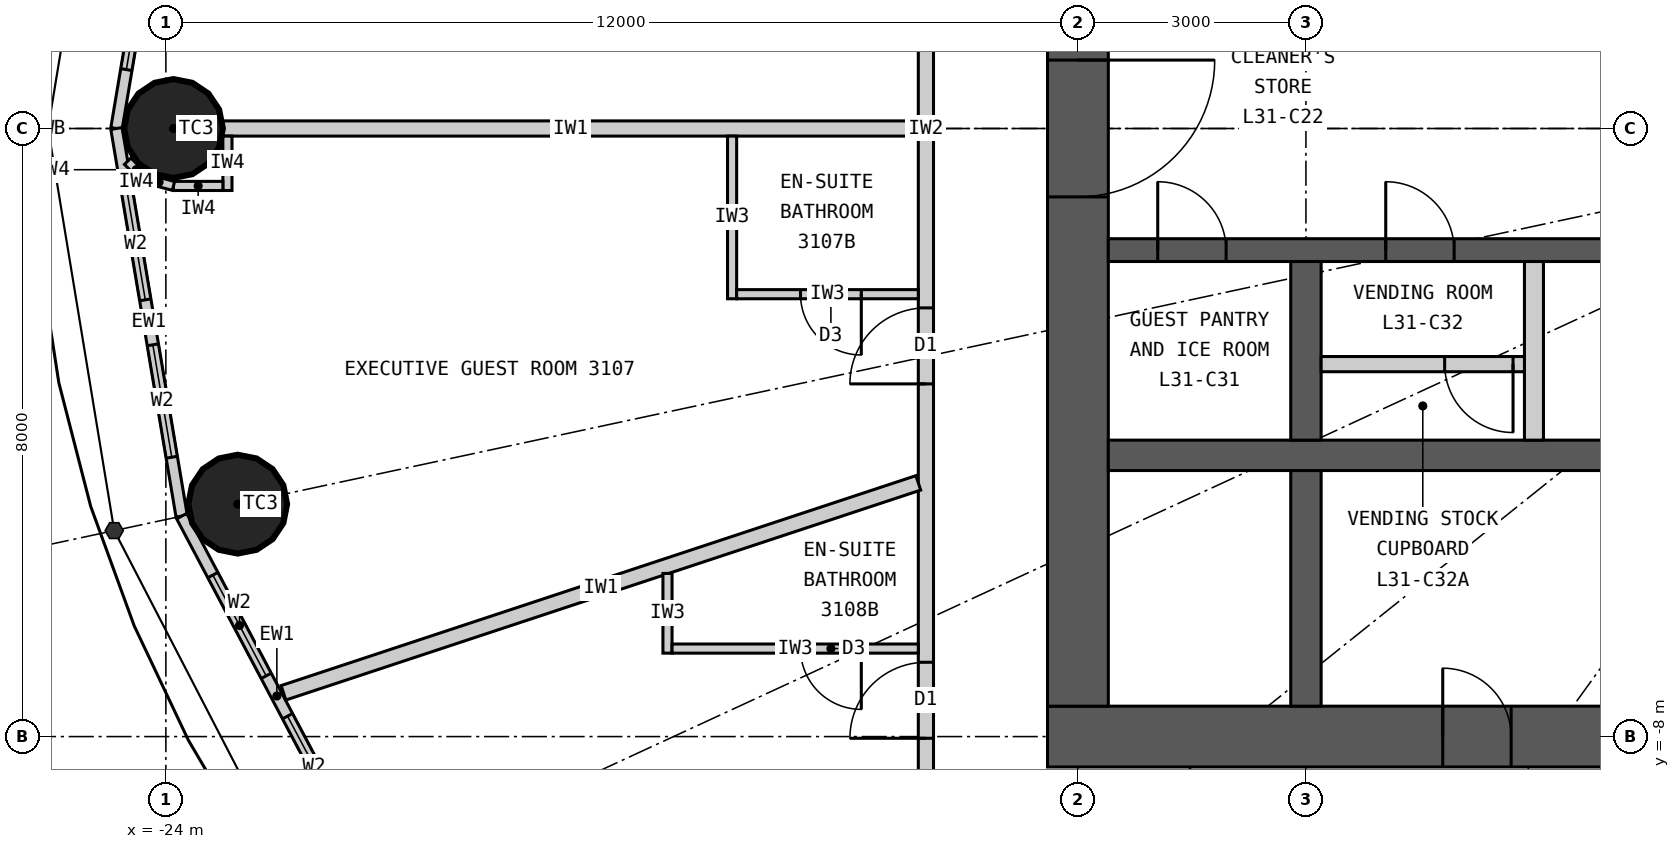
"""IFC4 building model, lengths in metres.
Left out: names, types, materials, properties, quantities, classifications, styles, units other than length and angle.
Written with IfcOpenShell. Run it as: python <this file> out.ifc"""

import sys

from ifc_helpers import new_model, si_unit, direction, frame, frame_2d, origin, origin_2d, place, context, subcontext, project, spatial, rectangle, circle, extrude, element, fill, save


model = new_model("IFC4")
c1 = context("Model", 3, precision=1e-05, world=origin(), true_north=direction((0.0, 1.0)))
c2 = subcontext(c1, "Body", "Model", "MODEL_VIEW")
j1 = project(units=[si_unit("LENGTHUNIT", "METRE"), si_unit("PLANEANGLEUNIT", "RADIAN")], contexts=[c1])
p1 = place(None, origin())
s1 = spatial("IfcSite", under=j1, at=p1, CompositionType="ELEMENT")
p2 = place(p1, origin())
s2 = spatial("IfcBuilding", under=s1, at=p2, CompositionType="ELEMENT")
p3 = place(p2, frame((0.0, 0.0, 122.1)))
s3 = spatial("IfcBuildingStorey", under=s2, at=p3, CompositionType="ELEMENT", Elevation=122.1)
for number, where, z_axis, x_axis in (
    (1, (-23.9, 0.0, 0.0), (0.0, 0.0, 1.0), (1.0, 0.0, 0.0)),
    (2, (-23.055, -4.942, 0.0), (0.0, 0.0, 1.0), (1.0, 0.0, 0.0)),
):
    element("IfcColumn", number, at=place(p3, frame(where, z_axis=z_axis, x_axis=x_axis)), inside=s3, PredefinedType="COLUMN", context=c2, shape_type="SweptSolid", body=[
        extrude(circle(Radius=0.65, at=origin_2d()), origin(), (0.0, 0.0, 1.0), 3.3),
    ])
p4 = place(p3, frame((12.4, -8.0, 0.0), z_axis=(0.0, 0.0, 1.0), x_axis=(-1.0, 0.0, 0.0)))
e3 = element("IfcWall", 3, at=p4, inside=s3, PredefinedType="SHEAR", context=c2, shape_type="SweptSolid", body=[
    extrude(rectangle(XDim=24.8, YDim=0.8, at=frame_2d((12.4, 0.0))), origin(), (0.0, 0.0, 1.0), 3.3),
])
p5 = place(p4, frame((11.1, 0.0, 0.0)))
e4 = element("IfcOpeningElement", 4, at=p5, cuts=e3, PredefinedType="OPENING", context=c2, shape_type="SweptSolid", body=[
    extrude(rectangle(XDim=1.2, YDim=2.2, at=frame_2d((0.6, 1.1))), frame((0.0, 0.41, 0.0), z_axis=(0.0, -1.0, 0.0), x_axis=(1.0, 0.0, 0.0)), (0.0, 0.0, 1.0), 0.82),
])
p6 = place(p4, frame((18.7, 0.0, 0.0)))
e5 = element("IfcOpeningElement", 5, at=p6, cuts=e3, PredefinedType="OPENING", context=c2, shape_type="SweptSolid", body=[
    extrude(rectangle(XDim=0.9, YDim=2.2, at=frame_2d((0.45, 1.1))), frame((0.0, 0.41, 0.0), z_axis=(0.0, -1.0, 0.0), x_axis=(1.0, 0.0, 0.0)), (0.0, 0.0, 1.0), 0.82),
])
p7 = place(p3, frame((-12.0, 7.6, 0.0), z_axis=(0.0, 0.0, 1.0), x_axis=(0.0, -1.0, 0.0)))
e6 = element("IfcWall", 6, at=p7, inside=s3, PredefinedType="SHEAR", context=c2, shape_type="SweptSolid", body=[
    extrude(rectangle(XDim=15.2, YDim=0.8, at=frame_2d((7.6, 0.0))), origin(), (0.0, 0.0, 1.0), 3.3),
])
p8 = place(p7, frame((6.7, 0.0, 0.0)))
e7 = element("IfcOpeningElement", 7, at=p8, cuts=e6, PredefinedType="OPENING", context=c2, shape_type="SweptSolid", body=[
    extrude(rectangle(XDim=1.8, YDim=2.2, at=frame_2d((0.9, 1.1))), frame((0.0, 0.41, 0.0), z_axis=(0.0, -1.0, 0.0), x_axis=(1.0, 0.0, 0.0)), (0.0, 0.0, 1.0), 0.82),
])
p9 = place(p3, frame((-11.6, -4.3, 0.0), z_axis=(0.0, 0.0, 1.0), x_axis=(1.0, 0.0, 0.0)))
e8 = element("IfcWall", 8, at=p9, inside=s3, PredefinedType="SHEAR", context=c2, shape_type="SweptSolid", body=[
    extrude(rectangle(XDim=23.2, YDim=0.4, at=frame_2d((11.6, 0.0))), origin(), (0.0, 0.0, 1.0), 3.3),
])
p10 = place(p3, frame((-11.6, -1.6, 0.0), z_axis=(0.0, 0.0, 1.0), x_axis=(1.0, 0.0, 0.0)))
e9 = element("IfcWall", 9, at=p10, inside=s3, PredefinedType="SHEAR", context=c2, shape_type="SweptSolid", body=[
    extrude(rectangle(XDim=23.2, YDim=0.3, at=frame_2d((11.6, 0.0))), origin(), (0.0, 0.0, 1.0), 3.3),
])
p11 = place(p10, frame((6.55, 0.0, 0.0)))
e10 = element("IfcOpeningElement", 10, at=p11, cuts=e9, PredefinedType="OPENING", context=c2, shape_type="SweptSolid", body=[
    extrude(rectangle(XDim=1.1, YDim=2.2, at=frame_2d((0.55, 1.1))), frame((0.0, 0.16, 0.0), z_axis=(0.0, -1.0, 0.0), x_axis=(1.0, 0.0, 0.0)), (0.0, 0.0, 1.0), 0.32),
])
p12 = place(p10, frame((15.3, 0.0, 0.0)))
e11 = element("IfcOpeningElement", 11, at=p12, cuts=e9, PredefinedType="OPENING", context=c2, shape_type="SweptSolid", body=[
    extrude(rectangle(XDim=1.6, YDim=2.4, at=frame_2d((0.8, 1.2))), frame((0.0, 0.16, 0.0), z_axis=(0.0, -1.0, 0.0), x_axis=(1.0, 0.0, 0.0)), (0.0, 0.0, 1.0), 0.32),
])
p13 = place(p10, frame((0.65, 0.0, 0.0)))
e12 = element("IfcOpeningElement", 12, at=p13, cuts=e9, PredefinedType="OPENING", context=c2, shape_type="SweptSolid", body=[
    extrude(rectangle(XDim=0.9, YDim=2.2, at=frame_2d((0.45, 1.1))), frame((0.0, 0.16, 0.0), z_axis=(0.0, -1.0, 0.0), x_axis=(1.0, 0.0, 0.0)), (0.0, 0.0, 1.0), 0.32),
])
p14 = place(p10, frame((3.65, 0.0, 0.0)))
e13 = element("IfcOpeningElement", 13, at=p14, cuts=e9, PredefinedType="OPENING", context=c2, shape_type="SweptSolid", body=[
    extrude(rectangle(XDim=0.9, YDim=2.2, at=frame_2d((0.45, 1.1))), frame((0.0, 0.16, 0.0), z_axis=(0.0, -1.0, 0.0), x_axis=(1.0, 0.0, 0.0)), (0.0, 0.0, 1.0), 0.32),
])
p15 = place(p10, frame((21.65, 0.0, 0.0)))
e14 = element("IfcOpeningElement", 14, at=p15, cuts=e9, PredefinedType="OPENING", context=c2, shape_type="SweptSolid", body=[
    extrude(rectangle(XDim=0.9, YDim=2.2, at=frame_2d((0.45, 1.1))), frame((0.0, 0.16, 0.0), z_axis=(0.0, -1.0, 0.0), x_axis=(1.0, 0.0, 0.0)), (0.0, 0.0, 1.0), 0.32),
])
p16 = place(p3, frame((-9.0, -4.1, 0.0), z_axis=(0.0, 0.0, 1.0), x_axis=(0.0, 1.0, 0.0)))
e15 = element("IfcWall", 15, at=p16, inside=s3, PredefinedType="SHEAR", context=c2, shape_type="SweptSolid", body=[
    extrude(rectangle(XDim=2.35, YDim=0.4, at=frame_2d((1.175, 0.0))), origin(), (0.0, 0.0, 1.0), 3.3),
])
p17 = place(p3, frame((-9.0, -7.6, 0.0), z_axis=(0.0, 0.0, 1.0), x_axis=(0.0, 1.0, 0.0)))
e16 = element("IfcWall", 16, at=p17, inside=s3, PredefinedType="SHEAR", context=c2, shape_type="SweptSolid", body=[
    extrude(rectangle(XDim=3.1, YDim=0.4, at=frame_2d((1.55, 0.0))), origin(), (0.0, 0.0, 1.0), 3.3),
])
p18 = place(p3, frame((-6.0, -4.1, 0.0), z_axis=(0.0, 0.0, 1.0), x_axis=(0.0, 1.0, 0.0)))
e17 = element("IfcWall", 17, at=p18, inside=s3, PredefinedType="PARTITIONING", context=c2, shape_type="SweptSolid", body=[
    extrude(rectangle(XDim=2.35, YDim=0.25, at=frame_2d((1.175, 0.0))), origin(), (0.0, 0.0, 1.0), 3.3),
])
p19 = place(p3, frame((-23.792, 5.1, 0.0), z_axis=(0.0, 0.0, 1.0), x_axis=(-0.165883894218, -0.986145290329, 0.0)))
e18 = element("IfcWall", 18, at=p19, inside=s3, PredefinedType="ELEMENTEDWALL", context=c2, shape_type="SweptSolid", body=[
    extrude(rectangle(XDim=5.172, YDim=0.15, at=frame_2d((2.586, 0.0))), origin(), (0.0, 0.0, 1.0), 3.12),
])
p20 = place(p19, frame((0.786, 0.0, 0.9)))
e19 = element("IfcOpeningElement", 19, at=p20, cuts=e18, PredefinedType="OPENING", context=c2, shape_type="SweptSolid", body=[
    extrude(rectangle(XDim=1.5, YDim=1.9, at=frame_2d((0.75, 0.95))), frame((0.0, 0.085, 0.0), z_axis=(0.0, -1.0, 0.0), x_axis=(1.0, 0.0, 0.0)), (0.0, 0.0, 1.0), 0.17),
])
p21 = place(p19, frame((2.886, 0.0, 0.9)))
e20 = element("IfcOpeningElement", 20, at=p21, cuts=e18, PredefinedType="OPENING", context=c2, shape_type="SweptSolid", body=[
    extrude(rectangle(XDim=1.5, YDim=1.9, at=frame_2d((0.75, 0.95))), frame((0.0, 0.085, 0.0), z_axis=(0.0, -1.0, 0.0), x_axis=(1.0, 0.0, 0.0)), (0.0, 0.0, 1.0), 0.17),
])
p22 = place(p3, frame((-24.65, 0.0, 0.0), z_axis=(0.0, 0.0, 1.0), x_axis=(0.165883894218, -0.986145290329, 0.0)))
e21 = element("IfcWall", 21, at=p22, inside=s3, PredefinedType="ELEMENTEDWALL", context=c2, shape_type="SweptSolid", body=[
    extrude(rectangle(XDim=5.172, YDim=0.15, at=frame_2d((2.586, 0.0))), origin(), (0.0, 0.0, 1.0), 3.12),
])
p23 = place(p22, frame((0.786, 0.0, 0.9)))
e22 = element("IfcOpeningElement", 22, at=p23, cuts=e21, PredefinedType="OPENING", context=c2, shape_type="SweptSolid", body=[
    extrude(rectangle(XDim=1.5, YDim=1.9, at=frame_2d((0.75, 0.95))), frame((0.0, 0.085, 0.0), z_axis=(0.0, -1.0, 0.0), x_axis=(1.0, 0.0, 0.0)), (0.0, 0.0, 1.0), 0.17),
])
p24 = place(p22, frame((2.886, 0.0, 0.9)))
e23 = element("IfcOpeningElement", 23, at=p24, cuts=e21, PredefinedType="OPENING", context=c2, shape_type="SweptSolid", body=[
    extrude(rectangle(XDim=1.5, YDim=1.9, at=frame_2d((0.75, 0.95))), frame((0.0, 0.085, 0.0), z_axis=(0.0, -1.0, 0.0), x_axis=(1.0, 0.0, 0.0)), (0.0, 0.0, 1.0), 0.17),
])
p25 = place(p3, frame((-23.792, -5.1, 0.0), z_axis=(0.0, 0.0, 1.0), x_axis=(0.467814388454, -0.883826735257, 0.0)))
e24 = element("IfcWall", 24, at=p25, inside=s3, PredefinedType="ELEMENTEDWALL", context=c2, shape_type="SweptSolid", body=[
    extrude(rectangle(XDim=5.354, YDim=0.15, at=frame_2d((2.677, 0.0))), origin(), (0.0, 0.0, 1.0), 3.12),
])
p26 = place(p25, frame((0.877, 0.0, 0.9)))
e25 = element("IfcOpeningElement", 25, at=p26, cuts=e24, PredefinedType="OPENING", context=c2, shape_type="SweptSolid", body=[
    extrude(rectangle(XDim=1.5, YDim=1.9, at=frame_2d((0.75, 0.95))), frame((0.0, 0.085, 0.0), z_axis=(0.0, -1.0, 0.0), x_axis=(1.0, 0.0, 0.0)), (0.0, 0.0, 1.0), 0.17),
])
p27 = place(p25, frame((2.977, 0.0, 0.9)))
e26 = element("IfcOpeningElement", 26, at=p27, cuts=e24, PredefinedType="OPENING", context=c2, shape_type="SweptSolid", body=[
    extrude(rectangle(XDim=1.5, YDim=1.9, at=frame_2d((0.75, 0.95))), frame((0.0, 0.085, 0.0), z_axis=(0.0, -1.0, 0.0), x_axis=(1.0, 0.0, 0.0)), (0.0, 0.0, 1.0), 0.17),
])
p28 = place(p3, frame((-14.0, 9.9, 0.0), z_axis=(0.0, 0.0, 1.0), x_axis=(0.0, -1.0, 0.0)))
e27 = element("IfcWall", 27, at=p28, inside=s3, PredefinedType="PARTITIONING", context=c2, shape_type="SweptSolid", body=[
    extrude(rectangle(XDim=19.8, YDim=0.2, at=frame_2d((9.9, 0.0))), origin(), (0.0, 0.0, 1.0), 3.12),
])
p29 = place(p28, frame((1.678, 0.0, 0.0)))
e28 = element("IfcOpeningElement", 28, at=p29, cuts=e27, PredefinedType="OPENING", context=c2, shape_type="SweptSolid", body=[
    extrude(rectangle(XDim=1.0, YDim=2.2, at=frame_2d((0.5, 1.1))), frame((0.0, 0.11, 0.0), z_axis=(0.0, -1.0, 0.0), x_axis=(1.0, 0.0, 0.0)), (0.0, 0.0, 1.0), 0.22),
])
p30 = place(p28, frame((7.598, 0.0, 0.0)))
e29 = element("IfcOpeningElement", 29, at=p30, cuts=e27, PredefinedType="OPENING", context=c2, shape_type="SweptSolid", body=[
    extrude(rectangle(XDim=1.0, YDim=2.2, at=frame_2d((0.5, 1.1))), frame((0.0, 0.11, 0.0), z_axis=(0.0, -1.0, 0.0), x_axis=(1.0, 0.0, 0.0)), (0.0, 0.0, 1.0), 0.22),
])
p31 = place(p28, frame((12.26, 0.0, 0.0)))
e30 = element("IfcOpeningElement", 30, at=p31, cuts=e27, PredefinedType="OPENING", context=c2, shape_type="SweptSolid", body=[
    extrude(rectangle(XDim=1.0, YDim=2.2, at=frame_2d((0.5, 1.1))), frame((0.0, 0.11, 0.0), z_axis=(0.0, -1.0, 0.0), x_axis=(1.0, 0.0, 0.0)), (0.0, 0.0, 1.0), 0.22),
])
p32 = place(p28, frame((16.922, 0.0, 0.0)))
e31 = element("IfcOpeningElement", 31, at=p32, cuts=e27, PredefinedType="OPENING", context=c2, shape_type="SweptSolid", body=[
    extrude(rectangle(XDim=1.0, YDim=2.2, at=frame_2d((0.5, 1.1))), frame((0.0, 0.11, 0.0), z_axis=(0.0, -1.0, 0.0), x_axis=(1.0, 0.0, 0.0)), (0.0, 0.0, 1.0), 0.22),
])
p33 = place(p3, frame((-14.1, 0.0, 0.0), z_axis=(0.0, 0.0, 1.0), x_axis=(-1.0, 0.0, 0.0)))
e32 = element("IfcWall", 32, at=p33, inside=s3, PredefinedType="PARTITIONING", context=c2, shape_type="SweptSolid", body=[
    extrude(rectangle(XDim=9.15, YDim=0.2, at=frame_2d((4.575, 0.0))), origin(), (0.0, 0.0, 1.0), 2.32),
])
p34 = place(p3, frame((-14.1, -4.662, 0.0), z_axis=(0.0, 0.0, 1.0), x_axis=(-0.949446466373, -0.313928984789, 0.0)))
e33 = element("IfcWall", 33, at=p34, inside=s3, PredefinedType="PARTITIONING", context=c2, shape_type="SweptSolid", body=[
    extrude(rectangle(XDim=8.797, YDim=0.2, at=frame_2d((4.399, 0.0))), origin(), (0.0, 0.0, 1.0), 3.12),
])
p35 = place(p3, frame((-16.55, -0.1, 0.0), z_axis=(0.0, 0.0, 1.0), x_axis=(0.0, -1.0, 0.0)))
e34 = element("IfcWall", 34, at=p35, inside=s3, PredefinedType="PARTITIONING", context=c2, shape_type="SweptSolid", body=[
    extrude(rectangle(XDim=2.14, YDim=0.12, at=frame_2d((1.07, 0.0))), origin(), (0.0, 0.0, 1.0), 3.12),
])
p36 = place(p3, frame((-14.1, -2.18, 0.0), z_axis=(0.0, 0.0, 1.0), x_axis=(-1.0, 0.0, 0.0)))
e35 = element("IfcWall", 35, at=p36, inside=s3, PredefinedType="PARTITIONING", context=c2, shape_type="SweptSolid", body=[
    extrude(rectangle(XDim=2.39, YDim=0.12, at=frame_2d((1.195, 0.0))), origin(), (0.0, 0.0, 1.0), 3.12),
])
p37 = place(p36, frame((0.75, 0.0, 0.0)))
e36 = element("IfcOpeningElement", 36, at=p37, cuts=e35, PredefinedType="OPENING", context=c2, shape_type="SweptSolid", body=[
    extrude(rectangle(XDim=0.8, YDim=2.1, at=frame_2d((0.4, 1.05))), frame((0.0, 0.07, 0.0), z_axis=(0.0, -1.0, 0.0), x_axis=(1.0, 0.0, 0.0)), (0.0, 0.0, 1.0), 0.14),
])
p38 = place(p3, frame((-17.4, -5.854, 0.0), z_axis=(0.0, 0.0, 1.0), x_axis=(0.0, -1.0, 0.0)))
e37 = element("IfcWall", 37, at=p38, inside=s3, PredefinedType="PARTITIONING", context=c2, shape_type="SweptSolid", body=[
    extrude(rectangle(XDim=1.049, YDim=0.12, at=frame_2d((0.524, 0.0))), origin(), (0.0, 0.0, 1.0), 3.12),
])
p39 = place(p3, frame((-14.1, -6.842, 0.0), z_axis=(0.0, 0.0, 1.0), x_axis=(-1.0, 0.0, 0.0)))
e38 = element("IfcWall", 38, at=p39, inside=s3, PredefinedType="PARTITIONING", context=c2, shape_type="SweptSolid", body=[
    extrude(rectangle(XDim=3.24, YDim=0.12, at=frame_2d((1.62, 0.0))), origin(), (0.0, 0.0, 1.0), 3.12),
])
p40 = place(p39, frame((0.75, 0.0, 0.0)))
e39 = element("IfcOpeningElement", 39, at=p40, cuts=e38, PredefinedType="OPENING", context=c2, shape_type="SweptSolid", body=[
    extrude(rectangle(XDim=0.8, YDim=2.1, at=frame_2d((0.4, 1.05))), frame((0.0, 0.07, 0.0), z_axis=(0.0, -1.0, 0.0), x_axis=(1.0, 0.0, 0.0)), (0.0, 0.0, 1.0), 0.14),
])
p41 = place(p3, frame((-8.8, -3.1, 0.0), z_axis=(0.0, 0.0, 1.0), x_axis=(1.0, 0.0, 0.0)))
e40 = element("IfcWall", 40, at=p41, inside=s3, PredefinedType="PARTITIONING", context=c2, shape_type="SweptSolid", body=[
    extrude(rectangle(XDim=2.675, YDim=0.2, at=frame_2d((1.337, 0.0))), origin(), (0.0, 0.0, 1.0), 3.12),
])
p42 = place(p41, frame((1.625, 0.0, 0.0)))
e41 = element("IfcOpeningElement", 41, at=p42, cuts=e40, PredefinedType="OPENING", context=c2, shape_type="SweptSolid", body=[
    extrude(rectangle(XDim=0.9, YDim=2.2, at=frame_2d((0.45, 1.1))), frame((0.0, 0.11, 0.0), z_axis=(0.0, -1.0, 0.0), x_axis=(1.0, 0.0, 0.0)), (0.0, 0.0, 1.0), 0.22),
])
p43 = place(p3, frame((-23.19, -0.1, 0.0), z_axis=(0.0, 0.0, 1.0), x_axis=(0.0, -1.0, 0.0)))
e42 = element("IfcWall", 42, at=p43, inside=s3, PredefinedType="PARTITIONING", context=c2, shape_type="SweptSolid", body=[
    extrude(rectangle(XDim=0.716, YDim=0.12, at=frame_2d((0.358, 0.0))), origin(), (0.0, 0.0, 1.0), 3.12),
])
p44 = place(p3, frame((-23.25, -0.756, 0.0), z_axis=(0.0, 0.0, 1.0), x_axis=(-1.0, 0.0, 0.0)))
e43 = element("IfcWall", 43, at=p44, inside=s3, PredefinedType="PARTITIONING", context=c2, shape_type="SweptSolid", body=[
    extrude(rectangle(XDim=0.65, YDim=0.12, at=frame_2d((0.325, 0.0))), origin(), (0.0, 0.0, 1.0), 3.12),
])
p45 = place(p3, frame((-23.9, -0.756, 0.0), z_axis=(0.0, 0.0, 1.0), x_axis=(-0.965892334856, 0.2589440045, 0.0)))
e44 = element("IfcWall", 44, at=p45, inside=s3, PredefinedType="PARTITIONING", context=c2, shape_type="SweptSolid", body=[
    extrude(rectangle(XDim=0.391, YDim=0.12, at=frame_2d((0.196, 0.0))), origin(), (0.0, 0.0, 1.0), 3.12),
])
p46 = place(p3, frame((-24.278, -0.655, 0.0), z_axis=(0.0, 0.0, 1.0), x_axis=(-0.707106781187, 0.707106781187, 0.0)))
e45 = element("IfcWall", 45, at=p46, inside=s3, PredefinedType="PARTITIONING", context=c2, shape_type="SweptSolid", body=[
    extrude(rectangle(XDim=0.318, YDim=0.12, at=frame_2d((0.159, 0.0))), origin(), (0.0, 0.0, 1.0), 3.12),
])
p47 = place(p21, origin())
e46 = element("IfcWindow", 46, at=p47, inside=s3, PartitioningType="SINGLE_PANEL", PredefinedType="WINDOW", context=c2, shape_type="SweptSolid", body=[
    extrude(rectangle(XDim=1.5, YDim=1.9, at=frame_2d((0.75, 0.95))), frame((0.0, 0.03, 0.0), z_axis=(0.0, -1.0, 0.0), x_axis=(1.0, 0.0, 0.0)), (0.0, 0.0, 1.0), 0.06),
])
fill(e20, e46)
p48 = place(p23, origin())
e47 = element("IfcWindow", 47, at=p48, inside=s3, PartitioningType="SINGLE_PANEL", PredefinedType="WINDOW", context=c2, shape_type="SweptSolid", body=[
    extrude(rectangle(XDim=1.5, YDim=1.9, at=frame_2d((0.75, 0.95))), frame((0.0, 0.03, 0.0), z_axis=(0.0, -1.0, 0.0), x_axis=(1.0, 0.0, 0.0)), (0.0, 0.0, 1.0), 0.06),
])
fill(e22, e47)
p49 = place(p24, origin())
e48 = element("IfcWindow", 48, at=p49, inside=s3, PartitioningType="SINGLE_PANEL", PredefinedType="WINDOW", context=c2, shape_type="SweptSolid", body=[
    extrude(rectangle(XDim=1.5, YDim=1.9, at=frame_2d((0.75, 0.95))), frame((0.0, 0.03, 0.0), z_axis=(0.0, -1.0, 0.0), x_axis=(1.0, 0.0, 0.0)), (0.0, 0.0, 1.0), 0.06),
])
fill(e23, e48)
p50 = place(p26, origin())
e49 = element("IfcWindow", 49, at=p50, inside=s3, PartitioningType="SINGLE_PANEL", PredefinedType="WINDOW", context=c2, shape_type="SweptSolid", body=[
    extrude(rectangle(XDim=1.5, YDim=1.9, at=frame_2d((0.75, 0.95))), frame((0.0, 0.03, 0.0), z_axis=(0.0, -1.0, 0.0), x_axis=(1.0, 0.0, 0.0)), (0.0, 0.0, 1.0), 0.06),
])
fill(e25, e49)
p51 = place(p27, origin())
e50 = element("IfcWindow", 50, at=p51, inside=s3, PartitioningType="SINGLE_PANEL", PredefinedType="WINDOW", context=c2, shape_type="SweptSolid", body=[
    extrude(rectangle(XDim=1.5, YDim=1.9, at=frame_2d((0.75, 0.95))), frame((0.0, 0.03, 0.0), z_axis=(0.0, -1.0, 0.0), x_axis=(1.0, 0.0, 0.0)), (0.0, 0.0, 1.0), 0.06),
])
fill(e26, e50)
p52 = place(p37, origin())
e51 = element("IfcDoor", 51, at=p52, inside=s3, OperationType="SINGLE_SWING_LEFT", PredefinedType="DOOR", context=c2, shape_type="SweptSolid", body=[
    extrude(rectangle(XDim=0.8, YDim=2.1, at=frame_2d((0.4, 1.05))), frame((0.0, 0.025, 0.0), z_axis=(0.0, -1.0, 0.0), x_axis=(1.0, 0.0, 0.0)), (0.0, 0.0, 1.0), 0.05),
])
fill(e36, e51)
p53 = place(p31, origin())
e52 = element("IfcDoor", 52, at=p53, inside=s3, OperationType="SINGLE_SWING_RIGHT", PredefinedType="DOOR", context=c2, shape_type="SweptSolid", body=[
    extrude(rectangle(XDim=1.0, YDim=2.2, at=frame_2d((0.5, 1.1))), frame((0.0, 0.025, 0.0), z_axis=(0.0, -1.0, 0.0), x_axis=(1.0, 0.0, 0.0)), (0.0, 0.0, 1.0), 0.05),
])
fill(e30, e52)
p54 = place(p40, origin())
e53 = element("IfcDoor", 53, at=p54, inside=s3, OperationType="SINGLE_SWING_LEFT", PredefinedType="DOOR", context=c2, shape_type="SweptSolid", body=[
    extrude(rectangle(XDim=0.8, YDim=2.1, at=frame_2d((0.4, 1.05))), frame((0.0, 0.025, 0.0), z_axis=(0.0, -1.0, 0.0), x_axis=(1.0, 0.0, 0.0)), (0.0, 0.0, 1.0), 0.05),
])
fill(e39, e53)
p55 = place(p32, origin())
e54 = element("IfcDoor", 54, at=p55, inside=s3, OperationType="SINGLE_SWING_RIGHT", PredefinedType="DOOR", context=c2, shape_type="SweptSolid", body=[
    extrude(rectangle(XDim=1.0, YDim=2.2, at=frame_2d((0.5, 1.1))), frame((0.0, 0.025, 0.0), z_axis=(0.0, -1.0, 0.0), x_axis=(1.0, 0.0, 0.0)), (0.0, 0.0, 1.0), 0.05),
])
fill(e31, e54)
p56 = place(p6, origin())
e55 = element("IfcDoor", 55, at=p56, inside=s3, OperationType="SINGLE_SWING_RIGHT", PredefinedType="DOOR", context=c2, shape_type="SweptSolid", body=[
    extrude(rectangle(XDim=0.9, YDim=2.2, at=frame_2d((0.45, 1.1))), frame((0.0, 0.025, 0.0), z_axis=(0.0, -1.0, 0.0), x_axis=(1.0, 0.0, 0.0)), (0.0, 0.0, 1.0), 0.05),
])
fill(e5, e55)
p57 = place(p13, origin())
e56 = element("IfcDoor", 56, at=p57, inside=s3, OperationType="SINGLE_SWING_LEFT", PredefinedType="DOOR", context=c2, shape_type="SweptSolid", body=[
    extrude(rectangle(XDim=0.9, YDim=2.2, at=frame_2d((0.45, 1.1))), frame((0.0, 0.025, 0.0), z_axis=(0.0, -1.0, 0.0), x_axis=(1.0, 0.0, 0.0)), (0.0, 0.0, 1.0), 0.05),
])
fill(e12, e56)
p58 = place(p42, origin())
e57 = element("IfcDoor", 57, at=p58, inside=s3, OperationType="SINGLE_SWING_RIGHT", PredefinedType="DOOR", context=c2, shape_type="SweptSolid", body=[
    extrude(rectangle(XDim=0.9, YDim=2.2, at=frame_2d((0.45, 1.1))), frame((0.0, 0.025, 0.0), z_axis=(0.0, -1.0, 0.0), x_axis=(1.0, 0.0, 0.0)), (0.0, 0.0, 1.0), 0.05),
])
fill(e41, e57)
p59 = place(p14, origin())
e58 = element("IfcDoor", 58, at=p59, inside=s3, OperationType="SINGLE_SWING_LEFT", PredefinedType="DOOR", context=c2, shape_type="SweptSolid", body=[
    extrude(rectangle(XDim=0.9, YDim=2.2, at=frame_2d((0.45, 1.1))), frame((0.0, 0.025, 0.0), z_axis=(0.0, -1.0, 0.0), x_axis=(1.0, 0.0, 0.0)), (0.0, 0.0, 1.0), 0.05),
])
fill(e13, e58)
p60 = place(p8, origin())
e59 = element("IfcDoor", 59, at=p60, inside=s3, OperationType="DOUBLE_DOOR_DOUBLE_SWING", PredefinedType="DOOR", context=c2, shape_type="SweptSolid", body=[
    extrude(rectangle(XDim=1.8, YDim=2.2, at=frame_2d((0.9, 1.1))), frame((0.0, 0.025, 0.0), z_axis=(0.0, -1.0, 0.0), x_axis=(1.0, 0.0, 0.0)), (0.0, 0.0, 1.0), 0.05),
])
fill(e7, e59)
save(model, sys.argv[1])
